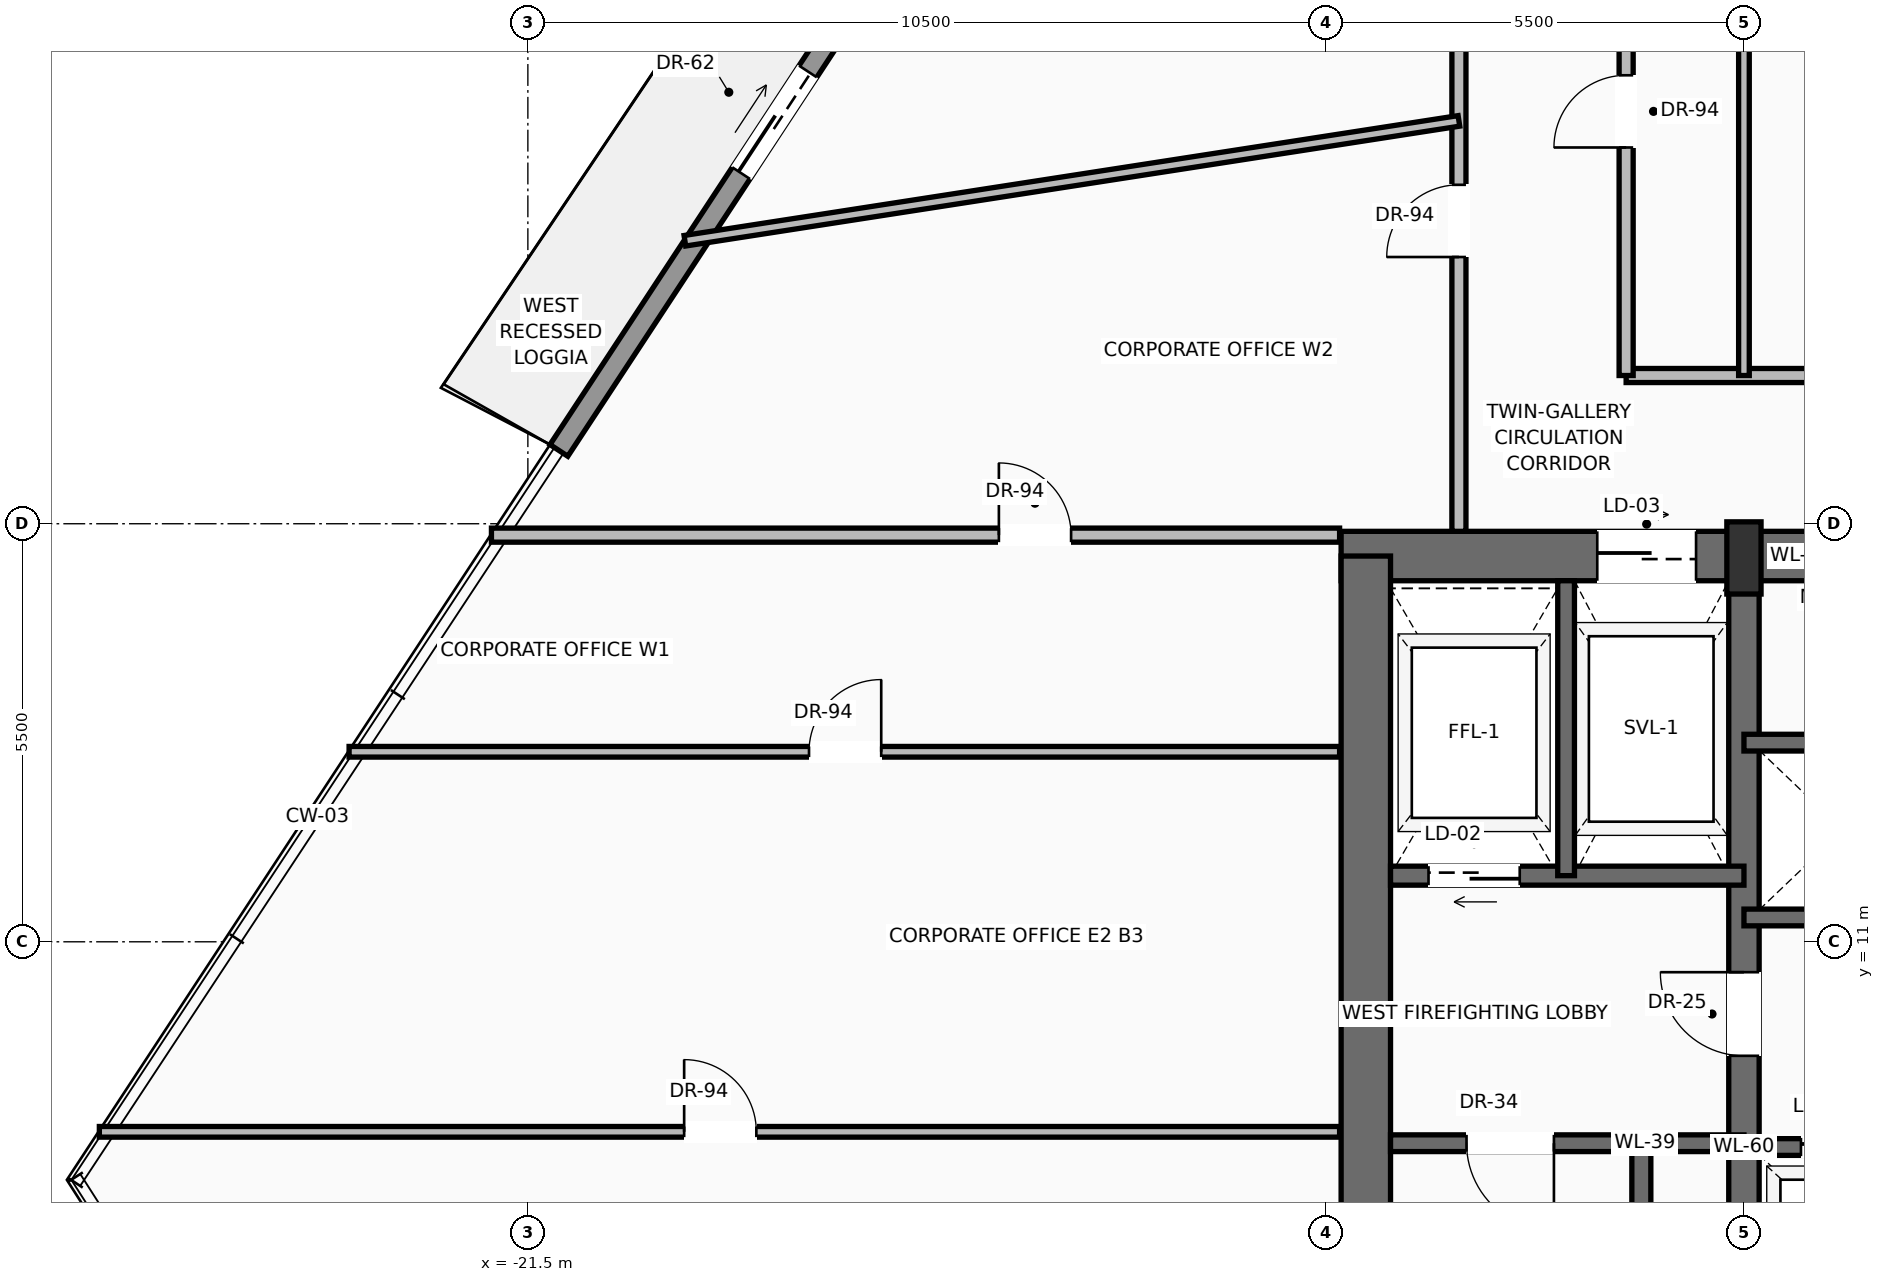
"""IFC4 building model, lengths in metres.
Left out: names, types, materials, properties, quantities, classifications, styles, units other than length and angle.
Written with IfcOpenShell. Run it as: python <this file> out.ifc"""

import sys

from ifc_helpers import new_model, si_unit, direction, frame, frame_2d, origin, origin_2d, place, context, subcontext, project, spatial, rectangle, extrude, source, transform, mapped, element, fill, save


model = new_model("IFC4")
c1 = context("Model", 3, precision=1e-05, world=origin(), true_north=direction((0.0, 1.0)))
c2 = subcontext(c1, "Body", "Model", "MODEL_VIEW")
j1 = project(units=[si_unit("LENGTHUNIT", "METRE"), si_unit("PLANEANGLEUNIT", "RADIAN")], contexts=[c1])
p1 = place(None, origin())
s1 = spatial("IfcSite", under=j1, at=p1, CompositionType="ELEMENT")
p2 = place(p1, origin())
s2 = spatial("IfcBuilding", under=s1, at=p2, CompositionType="ELEMENT")
p3 = place(p2, frame((0.0, 0.0, 129.3)))
s3 = spatial("IfcBuildingStorey", under=s2, at=p3, CompositionType="ELEMENT", Elevation=129.3)
p4 = place(p3, frame((-10.8, 16.075, 0.0), z_axis=(0.0, 0.0, 1.0), x_axis=(1.0, 0.0, 0.0)))
e1 = element("IfcWall", 1, at=p4, inside=s3, PredefinedType="SHEAR", context=c2, shape_type="SweptSolid", body=[
    extrude(rectangle(XDim=21.6, YDim=0.65, at=frame_2d((10.8, 0.0))), origin(), (0.0, 0.0, 1.0), 3.47),
])
p5 = place(p4, frame((3.37, 0.0, 0.0)))
e2 = element("IfcOpeningElement", 2, at=p5, cuts=e1, PredefinedType="OPENING", context=c2, shape_type="SweptSolid", body=[
    extrude(rectangle(XDim=1.3, YDim=2.3, at=frame_2d((0.65, 1.15))), frame((0.0, 0.335, 0.0), z_axis=(0.0, -1.0, 0.0), x_axis=(1.0, 0.0, 0.0)), (0.0, 0.0, 1.0), 0.67),
])
p6 = place(p4, frame((9.8, 0.0, 0.0)))
e3 = element("IfcOpeningElement", 3, at=p6, cuts=e1, PredefinedType="OPENING", context=c2, shape_type="SweptSolid", body=[
    extrude(rectangle(XDim=2.0, YDim=2.4, at=frame_2d((1.0, 1.2))), frame((0.0, 0.335, 0.0), z_axis=(0.0, -1.0, 0.0), x_axis=(1.0, 0.0, 0.0)), (0.0, 0.0, 1.0), 0.67),
])
p7 = place(p3, frame((-10.475, 0.525, 0.0), z_axis=(0.0, 0.0, 1.0), x_axis=(0.0, 1.0, 0.0)))
e4 = element("IfcWall", 4, at=p7, inside=s3, PredefinedType="SHEAR", context=c2, shape_type="SweptSolid", body=[
    extrude(rectangle(XDim=15.55, YDim=0.65, at=frame_2d((7.775, 0.0))), origin(), (0.0, 0.0, 1.0), 3.47),
])
p8 = place(p3, frame((-5.5, 0.525, 0.0), z_axis=(0.0, 0.0, 1.0), x_axis=(0.0, 1.0, 0.0)))
e5 = element("IfcWall", 5, at=p8, inside=s3, PredefinedType="SHEAR", context=c2, shape_type="SweptSolid", body=[
    extrude(rectangle(XDim=15.55, YDim=0.4, at=frame_2d((7.775, 0.0))), origin(), (0.0, 0.0, 1.0), 3.47),
])
p9 = place(p8, frame((8.975, 0.0, 0.0)))
e6 = element("IfcOpeningElement", 6, at=p9, cuts=e5, PredefinedType="OPENING", context=c2, shape_type="SweptSolid", body=[
    extrude(rectangle(XDim=1.1, YDim=2.2, at=frame_2d((0.55, 1.1))), frame((0.0, 0.21, 0.0), z_axis=(0.0, -1.0, 0.0), x_axis=(1.0, 0.0, 0.0)), (0.0, 0.0, 1.0), 0.42),
])
m1 = source(origin(), c2, "Body", "SweptSolid", [
    extrude(rectangle(XDim=0.45, YDim=0.95, at=origin_2d()), origin(), (0.0, 0.0, 1.0), 3.7),
])
p10 = place(p3, frame((-5.5, 16.05, 0.0), z_axis=(0.0, 0.0, 1.0), x_axis=(1.0, 0.0, 0.0)))
e7 = element("IfcColumn", 7, at=p10, inside=s3, PredefinedType="PILASTER", context=c2, shape_type="MappedRepresentation", body=[
    mapped(m1, transform((0.0, 0.0, 0.0), scale=1.0)),
])
p11 = place(p3, frame((-21.091, 17.464, 0.0), z_axis=(0.0, 0.0, 1.0), x_axis=(0.549184046642, 0.835701431681, 0.0)))
e8 = element("IfcWall", 8, at=p11, inside=s3, PredefinedType="SOLIDWALL", context=c2, shape_type="SweptSolid", body=[
    extrude(rectangle(XDim=18.19, YDim=0.28, at=frame_2d((9.095, 0.0))), origin(), (0.0, 0.0, 1.0), 3.05),
])
p12 = place(p11, frame((4.365, 0.0, 0.0)))
e9 = element("IfcOpeningElement", 9, at=p12, cuts=e8, PredefinedType="OPENING", context=c2, shape_type="SweptSolid", body=[
    extrude(rectangle(XDim=1.6, YDim=2.35, at=frame_2d((0.8, 1.175))), frame((0.0, 0.15, 0.0), z_axis=(0.0, -1.0, 0.0), x_axis=(1.0, 0.0, 0.0)), (0.0, 0.0, 1.0), 0.3),
])
p13 = place(p11, frame((12.369, 0.0, 0.9)))
e10 = element("IfcOpeningElement", 10, at=p13, cuts=e8, PredefinedType="OPENING", context=c2, shape_type="SweptSolid", body=[
    extrude(rectangle(XDim=2.0, YDim=1.85, at=frame_2d((1.0, 0.925))), frame((0.0, 0.15, 0.0), z_axis=(0.0, -1.0, 0.0), x_axis=(1.0, 0.0, 0.0)), (0.0, 0.0, 1.0), 0.3),
])
p14 = place(p3, frame((-6.85, 0.85, 0.0), z_axis=(0.0, 0.0, 1.0), x_axis=(0.0, 1.0, 0.0)))
e11 = element("IfcWall", 11, at=p14, inside=s3, PredefinedType="SOLIDWALL", context=c2, shape_type="SweptSolid", body=[
    extrude(rectangle(XDim=7.5, YDim=0.25, at=frame_2d((3.75, 0.0))), origin(), (0.0, 0.0, 1.0), 3.47),
])
p15 = place(p3, frame((-5.5, 8.35, 0.0), z_axis=(0.0, 0.0, 1.0), x_axis=(-1.0, 0.0, 0.0)))
e12 = element("IfcWall", 12, at=p15, inside=s3, PredefinedType="SOLIDWALL", context=c2, shape_type="SweptSolid", body=[
    extrude(rectangle(XDim=4.65, YDim=0.22, at=frame_2d((2.325, 0.0))), origin(), (0.0, 0.0, 1.0), 3.47),
])
p16 = place(p15, frame((2.5, 0.0, 0.0)))
e13 = element("IfcOpeningElement", 13, at=p16, cuts=e12, PredefinedType="OPENING", context=c2, shape_type="SweptSolid", body=[
    extrude(rectangle(XDim=1.15, YDim=2.2, at=frame_2d((0.575, 1.1))), frame((0.0, 0.12, 0.0), z_axis=(0.0, -1.0, 0.0), x_axis=(1.0, 0.0, 0.0)), (0.0, 0.0, 1.0), 0.24),
])
p17 = place(p3, frame((-5.5, 11.87, 0.0), z_axis=(0.0, 0.0, 1.0), x_axis=(-1.0, 0.0, 0.0)))
e14 = element("IfcWall", 14, at=p17, inside=s3, PredefinedType="SOLIDWALL", context=c2, shape_type="SweptSolid", body=[
    extrude(rectangle(XDim=4.65, YDim=0.25, at=frame_2d((2.325, 0.0))), origin(), (0.0, 0.0, 1.0), 3.47),
])
p18 = place(p17, frame((2.95, 0.0, 0.0)))
e15 = element("IfcOpeningElement", 15, at=p18, cuts=e14, PredefinedType="OPENING", context=c2, shape_type="SweptSolid", body=[
    extrude(rectangle(XDim=1.2, YDim=2.25, at=frame_2d((0.6, 1.125))), frame((0.0, 0.135, 0.0), z_axis=(0.0, -1.0, 0.0), x_axis=(1.0, 0.0, 0.0)), (0.0, 0.0, 1.0), 0.27),
])
p19 = place(p3, frame((-7.84, 11.87, 0.0), z_axis=(0.0, 0.0, 1.0), x_axis=(0.0, 1.0, 0.0)))
e16 = element("IfcWall", 16, at=p19, inside=s3, PredefinedType="SOLIDWALL", context=c2, shape_type="SweptSolid", body=[
    extrude(rectangle(XDim=3.88, YDim=0.22, at=frame_2d((1.94, 0.0))), origin(), (0.0, 0.0, 1.0), 3.47),
])
p20 = place(p3, frame((-5.5, 8.3, 0.0), z_axis=(0.0, 0.0, 1.0), x_axis=(1.0, 0.0, 0.0)))
e17 = element("IfcWall", 17, at=p20, inside=s3, PredefinedType="SOLIDWALL", context=c2, shape_type="SweptSolid", body=[
    extrude(rectangle(XDim=7.32, YDim=0.22, at=frame_2d((3.66, 0.0))), origin(), (0.0, 0.0, 1.0), 3.47),
])
p21 = place(p20, frame((0.75, 0.0, 0.0)))
e18 = element("IfcOpeningElement", 18, at=p21, cuts=e17, PredefinedType="OPENING", context=c2, shape_type="SweptSolid", body=[
    extrude(rectangle(XDim=1.1, YDim=2.2, at=frame_2d((0.55, 1.1))), frame((0.0, 0.12, 0.0), z_axis=(0.0, -1.0, 0.0), x_axis=(1.0, 0.0, 0.0)), (0.0, 0.0, 1.0), 0.24),
])
p22 = place(p20, frame((3.15, 0.0, 0.0)))
e19 = element("IfcOpeningElement", 19, at=p22, cuts=e17, PredefinedType="OPENING", context=c2, shape_type="SweptSolid", body=[
    extrude(rectangle(XDim=1.1, YDim=2.2, at=frame_2d((0.55, 1.1))), frame((0.0, 0.12, 0.0), z_axis=(0.0, -1.0, 0.0), x_axis=(1.0, 0.0, 0.0)), (0.0, 0.0, 1.0), 0.24),
])
p23 = place(p20, frame((5.55, 0.0, 0.0)))
e20 = element("IfcOpeningElement", 20, at=p23, cuts=e17, PredefinedType="OPENING", context=c2, shape_type="SweptSolid", body=[
    extrude(rectangle(XDim=1.1, YDim=2.2, at=frame_2d((0.55, 1.1))), frame((0.0, 0.12, 0.0), z_axis=(0.0, -1.0, 0.0), x_axis=(1.0, 0.0, 0.0)), (0.0, 0.0, 1.0), 0.24),
])
for number, where, z_axis, x_axis in (
    (21, (-5.5, 11.32, 0.0), (0.0, 0.0, 1.0), (1.0, 0.0, 0.0)),
    (22, (-5.5, 13.62, 0.0), (0.0, 0.0, 1.0), (1.0, 0.0, 0.0)),
):
    element("IfcWall", number, at=place(p3, frame(where, z_axis=z_axis, x_axis=x_axis)), inside=s3, PredefinedType="SOLIDWALL", context=c2, shape_type="SweptSolid", body=[
        extrude(rectangle(XDim=7.32, YDim=0.22, at=frame_2d((3.66, 0.0))), origin(), (0.0, 0.0, 1.0), 3.47),
    ])
p24 = place(p3, frame((-7.05, 18.45, 0.0), z_axis=(0.0, 0.0, 1.0), x_axis=(1.0, 0.0, 0.0)))
e23 = element("IfcWall", 23, at=p24, inside=s3, PredefinedType="PARTITIONING", context=c2, shape_type="SweptSolid", body=[
    extrude(rectangle(XDim=14.1, YDim=0.185, at=frame_2d((7.05, 0.0))), origin(), (0.0, 0.0, 1.0), 2.846),
])
p25 = place(p24, frame((6.575, 0.0, 0.0)))
e24 = element("IfcOpeningElement", 24, at=p25, cuts=e23, PredefinedType="OPENING", context=c2, shape_type="SweptSolid", body=[
    extrude(rectangle(XDim=0.95, YDim=2.2, at=frame_2d((0.475, 1.1))), frame((0.0, 0.103, 0.0), z_axis=(0.0, -1.0, 0.0), x_axis=(1.0, 0.0, 0.0)), (0.0, 0.0, 1.0), 0.205),
])
p26 = place(p3, frame((-7.05, 18.45, 0.0), z_axis=(0.0, 0.0, 1.0), x_axis=(0.0, 1.0, 0.0)))
e25 = element("IfcWall", 25, at=p26, inside=s3, PredefinedType="PARTITIONING", context=c2, shape_type="SweptSolid", body=[
    extrude(rectangle(XDim=6.95, YDim=0.185, at=frame_2d((3.475, 0.0))), origin(), (0.0, 0.0, 1.0), 2.846),
])
p27 = place(p26, frame((3.0, 0.0, 0.0)))
e26 = element("IfcOpeningElement", 26, at=p27, cuts=e25, PredefinedType="OPENING", context=c2, shape_type="SweptSolid", body=[
    extrude(rectangle(XDim=0.95, YDim=2.2, at=frame_2d((0.475, 1.1))), frame((0.0, 0.103, 0.0), z_axis=(0.0, -1.0, 0.0), x_axis=(1.0, 0.0, 0.0)), (0.0, 0.0, 1.0), 0.205),
])
p28 = place(p3, frame((-9.25, 16.4, 0.0), z_axis=(0.0, 0.0, 1.0), x_axis=(0.0, 1.0, 0.0)))
e27 = element("IfcWall", 27, at=p28, inside=s3, PredefinedType="PARTITIONING", context=c2, shape_type="SweptSolid", body=[
    extrude(rectangle(XDim=9.0, YDim=0.185, at=frame_2d((4.5, 0.0))), origin(), (0.0, 0.0, 1.0), 2.846),
])
p29 = place(p28, frame((3.609, 0.0, 0.0)))
e28 = element("IfcOpeningElement", 28, at=p29, cuts=e27, PredefinedType="OPENING", context=c2, shape_type="SweptSolid", body=[
    extrude(rectangle(XDim=0.95, YDim=2.2, at=frame_2d((0.475, 1.1))), frame((0.0, 0.103, 0.0), z_axis=(0.0, -1.0, 0.0), x_axis=(1.0, 0.0, 0.0)), (0.0, 0.0, 1.0), 0.205),
])
p30 = place(p28, frame((6.368, 0.0, 0.0)))
e29 = element("IfcOpeningElement", 29, at=p30, cuts=e27, PredefinedType="OPENING", context=c2, shape_type="SweptSolid", body=[
    extrude(rectangle(XDim=0.95, YDim=2.2, at=frame_2d((0.475, 1.1))), frame((0.0, 0.103, 0.0), z_axis=(0.0, -1.0, 0.0), x_axis=(1.0, 0.0, 0.0)), (0.0, 0.0, 1.0), 0.205),
])
p31 = place(p3, frame((-21.979, 16.35, 0.0), z_axis=(0.0, 0.0, 1.0), x_axis=(1.0, 0.0, 0.0)))
e30 = element("IfcWall", 30, at=p31, inside=s3, PredefinedType="PARTITIONING", context=c2, shape_type="SweptSolid", body=[
    extrude(rectangle(XDim=11.159, YDim=0.185, at=frame_2d((5.58, 0.0))), origin(), (0.0, 0.0, 1.0), 3.462),
])
p32 = place(p31, frame((6.677, 0.0, 0.0)))
e31 = element("IfcOpeningElement", 31, at=p32, cuts=e30, PredefinedType="OPENING", context=c2, shape_type="SweptSolid", body=[
    extrude(rectangle(XDim=0.95, YDim=2.2, at=frame_2d((0.475, 1.1))), frame((0.0, 0.103, 0.0), z_axis=(0.0, -1.0, 0.0), x_axis=(1.0, 0.0, 0.0)), (0.0, 0.0, 1.0), 0.205),
])
p33 = place(p3, frame((-5.5, 18.45, 0.0), z_axis=(0.0, 0.0, 1.0), x_axis=(0.0, 1.0, 0.0)))
e32 = element("IfcWall", 32, at=p33, inside=s3, PredefinedType="PARTITIONING", context=c2, shape_type="SweptSolid", body=[
    extrude(rectangle(XDim=14.05, YDim=0.14, at=frame_2d((7.025, 0.0))), origin(), (0.0, 0.0, 1.0), 2.846),
])
p34 = place(p3, frame((-27.138, 8.5, 0.0), z_axis=(0.0, 0.0, 1.0), x_axis=(1.0, 0.0, 0.0)))
e33 = element("IfcWall", 33, at=p34, inside=s3, PredefinedType="PARTITIONING", context=c2, shape_type="SweptSolid", body=[
    extrude(rectangle(XDim=16.318, YDim=0.14, at=frame_2d((8.159, 0.0))), origin(), (0.0, 0.0, 1.0), 3.462),
])
p35 = place(p34, frame((7.694, 0.0, 0.0)))
e34 = element("IfcOpeningElement", 34, at=p35, cuts=e33, PredefinedType="OPENING", context=c2, shape_type="SweptSolid", body=[
    extrude(rectangle(XDim=0.95, YDim=2.2, at=frame_2d((0.475, 1.1))), frame((0.0, 0.08, 0.0), z_axis=(0.0, -1.0, 0.0), x_axis=(1.0, 0.0, 0.0)), (0.0, 0.0, 1.0), 0.16),
])
p36 = place(p3, frame((-23.852, 13.5, 0.0), z_axis=(0.0, 0.0, 1.0), x_axis=(1.0, 0.0, 0.0)))
e35 = element("IfcWall", 35, at=p36, inside=s3, PredefinedType="PARTITIONING", context=c2, shape_type="SweptSolid", body=[
    extrude(rectangle(XDim=13.032, YDim=0.14, at=frame_2d((6.516, 0.0))), origin(), (0.0, 0.0, 1.0), 3.049),
])
p37 = place(p36, frame((6.051, 0.0, 0.0)))
e36 = element("IfcOpeningElement", 36, at=p37, cuts=e35, PredefinedType="OPENING", context=c2, shape_type="SweptSolid", body=[
    extrude(rectangle(XDim=0.95, YDim=2.2, at=frame_2d((0.475, 1.1))), frame((0.0, 0.08, 0.0), z_axis=(0.0, -1.0, 0.0), x_axis=(1.0, 0.0, 0.0)), (0.0, 0.0, 1.0), 0.16),
])
p38 = place(p3, frame((-19.434, 20.223, 0.0), z_axis=(0.0, 0.0, 1.0), x_axis=(0.988220028994, 0.153039780105, 0.0)))
e37 = element("IfcWall", 37, at=p38, inside=s3, PredefinedType="PARTITIONING", context=c2, shape_type="SweptSolid", body=[
    extrude(rectangle(XDim=10.305, YDim=0.14, at=frame_2d((5.153, 0.0))), origin(), (0.0, 0.0, 1.0), 3.462),
])
m2 = source(origin(), c2, "Body", "SweptSolid", [
    extrude(rectangle(XDim=1.6, YDim=2.35, at=frame_2d((0.8, 1.175))), frame((0.0, 0.025, 0.0), z_axis=(0.0, -1.0, 0.0), x_axis=(1.0, 0.0, 0.0)), (0.0, 0.0, 1.0), 0.05),
])
p39 = place(p12, origin())
e38 = element("IfcDoor", 38, at=p39, inside=s3, OperationType="SLIDING_TO_LEFT", PredefinedType="DOOR", context=c2, shape_type="MappedRepresentation", body=[
    mapped(m2, transform((0.0, 0.0, 0.0), scale=1.0)),
])
fill(e9, e38)
m3 = source(origin(), c2, "Body", "SweptSolid", [
    extrude(rectangle(XDim=1.15, YDim=2.2, at=frame_2d((0.575, 1.1))), frame((0.0, 0.025, 0.0), z_axis=(0.0, -1.0, 0.0), x_axis=(1.0, 0.0, 0.0)), (0.0, 0.0, 1.0), 0.05),
])
p40 = place(p16, origin())
e39 = element("IfcDoor", 39, at=p40, inside=s3, OperationType="SINGLE_SWING_LEFT", PredefinedType="DOOR", context=c2, shape_type="MappedRepresentation", body=[
    mapped(m3, transform((0.0, 0.0, 0.0), scale=1.0)),
])
fill(e13, e39)
m4 = source(origin(), c2, "Body", "SweptSolid", [
    extrude(rectangle(XDim=1.1, YDim=2.2, at=frame_2d((0.55, 1.1))), frame((0.0, 0.025, 0.0), z_axis=(0.0, -1.0, 0.0), x_axis=(1.0, 0.0, 0.0)), (0.0, 0.0, 1.0), 0.05),
])
p41 = place(p9, origin())
e40 = element("IfcDoor", 40, at=p41, inside=s3, OperationType="SINGLE_SWING_RIGHT", PredefinedType="DOOR", context=c2, shape_type="MappedRepresentation", body=[
    mapped(m4, transform((0.0, 0.0, 0.0), scale=1.0)),
])
fill(e6, e40)
m5 = source(origin(), c2, "Body", "SweptSolid", [
    extrude(rectangle(XDim=1.2, YDim=2.25, at=frame_2d((0.6, 1.125))), frame((0.0, 0.025, 0.0), z_axis=(0.0, -1.0, 0.0), x_axis=(1.0, 0.0, 0.0)), (0.0, 0.0, 1.0), 0.05),
])
p42 = place(p18, origin())
e41 = element("IfcDoor", 41, at=p42, inside=s3, OperationType="SLIDING_TO_LEFT", PredefinedType="DOOR", context=c2, shape_type="MappedRepresentation", body=[
    mapped(m5, transform((0.0, 0.0, 0.0), scale=1.0)),
])
fill(e15, e41)
m6 = source(origin(), c2, "Body", "SweptSolid", [
    extrude(rectangle(XDim=1.3, YDim=2.3, at=frame_2d((0.65, 1.15))), frame((0.0, 0.025, 0.0), z_axis=(0.0, -1.0, 0.0), x_axis=(1.0, 0.0, 0.0)), (0.0, 0.0, 1.0), 0.05),
])
p43 = place(p5, origin())
e42 = element("IfcDoor", 42, at=p43, inside=s3, OperationType="SLIDING_TO_RIGHT", PredefinedType="DOOR", context=c2, shape_type="MappedRepresentation", body=[
    mapped(m6, transform((0.0, 0.0, 0.0), scale=1.0)),
])
fill(e2, e42)
m7 = source(origin(), c2, "Body", "SweptSolid", [
    extrude(rectangle(XDim=1.1, YDim=2.2, at=frame_2d((0.55, 1.1))), frame((0.0, 0.025, 0.0), z_axis=(0.0, -1.0, 0.0), x_axis=(1.0, 0.0, 0.0)), (0.0, 0.0, 1.0), 0.05),
])
p44 = place(p21, origin())
e43 = element("IfcDoor", 43, at=p44, inside=s3, OperationType="SLIDING_TO_LEFT", PredefinedType="DOOR", context=c2, shape_type="MappedRepresentation", body=[
    mapped(m7, transform((0.0, 0.0, 0.0), scale=1.0)),
])
fill(e18, e43)
m8 = source(origin(), c2, "Body", "SweptSolid", [
    extrude(rectangle(XDim=0.95, YDim=2.2, at=frame_2d((0.475, 1.1))), frame((0.0, 0.025, 0.0), z_axis=(0.0, -1.0, 0.0), x_axis=(1.0, 0.0, 0.0)), (0.0, 0.0, 1.0), 0.05),
])
p45 = place(p29, origin())
e44 = element("IfcDoor", 44, at=p45, inside=s3, OperationType="SINGLE_SWING_LEFT", PredefinedType="DOOR", context=c2, shape_type="MappedRepresentation", body=[
    mapped(m8, transform((0.0, 0.0, 0.0), scale=1.0)),
])
fill(e28, e44)
p46 = place(p32, origin())
e45 = element("IfcDoor", 45, at=p46, inside=s3, OperationType="SINGLE_SWING_LEFT", PredefinedType="DOOR", context=c2, shape_type="MappedRepresentation", body=[
    mapped(m8, transform((0.0, 0.0, 0.0), scale=1.0)),
])
fill(e31, e45)
p47 = place(p37, origin())
e46 = element("IfcDoor", 46, at=p47, inside=s3, OperationType="SINGLE_SWING_RIGHT", PredefinedType="DOOR", context=c2, shape_type="MappedRepresentation", body=[
    mapped(m8, transform((0.0, 0.0, 0.0), scale=1.0)),
])
fill(e36, e46)
p48 = place(p27, origin())
e47 = element("IfcDoor", 47, at=p48, inside=s3, OperationType="SINGLE_SWING_LEFT", PredefinedType="DOOR", context=c2, shape_type="MappedRepresentation", body=[
    mapped(m8, transform((0.0, 0.0, 0.0), scale=1.0)),
])
fill(e26, e47)
p49 = place(p35, origin())
e48 = element("IfcDoor", 48, at=p49, inside=s3, OperationType="SINGLE_SWING_LEFT", PredefinedType="DOOR", context=c2, shape_type="MappedRepresentation", body=[
    mapped(m8, transform((0.0, 0.0, 0.0), scale=1.0)),
])
fill(e34, e48)
save(model, sys.argv[1])
